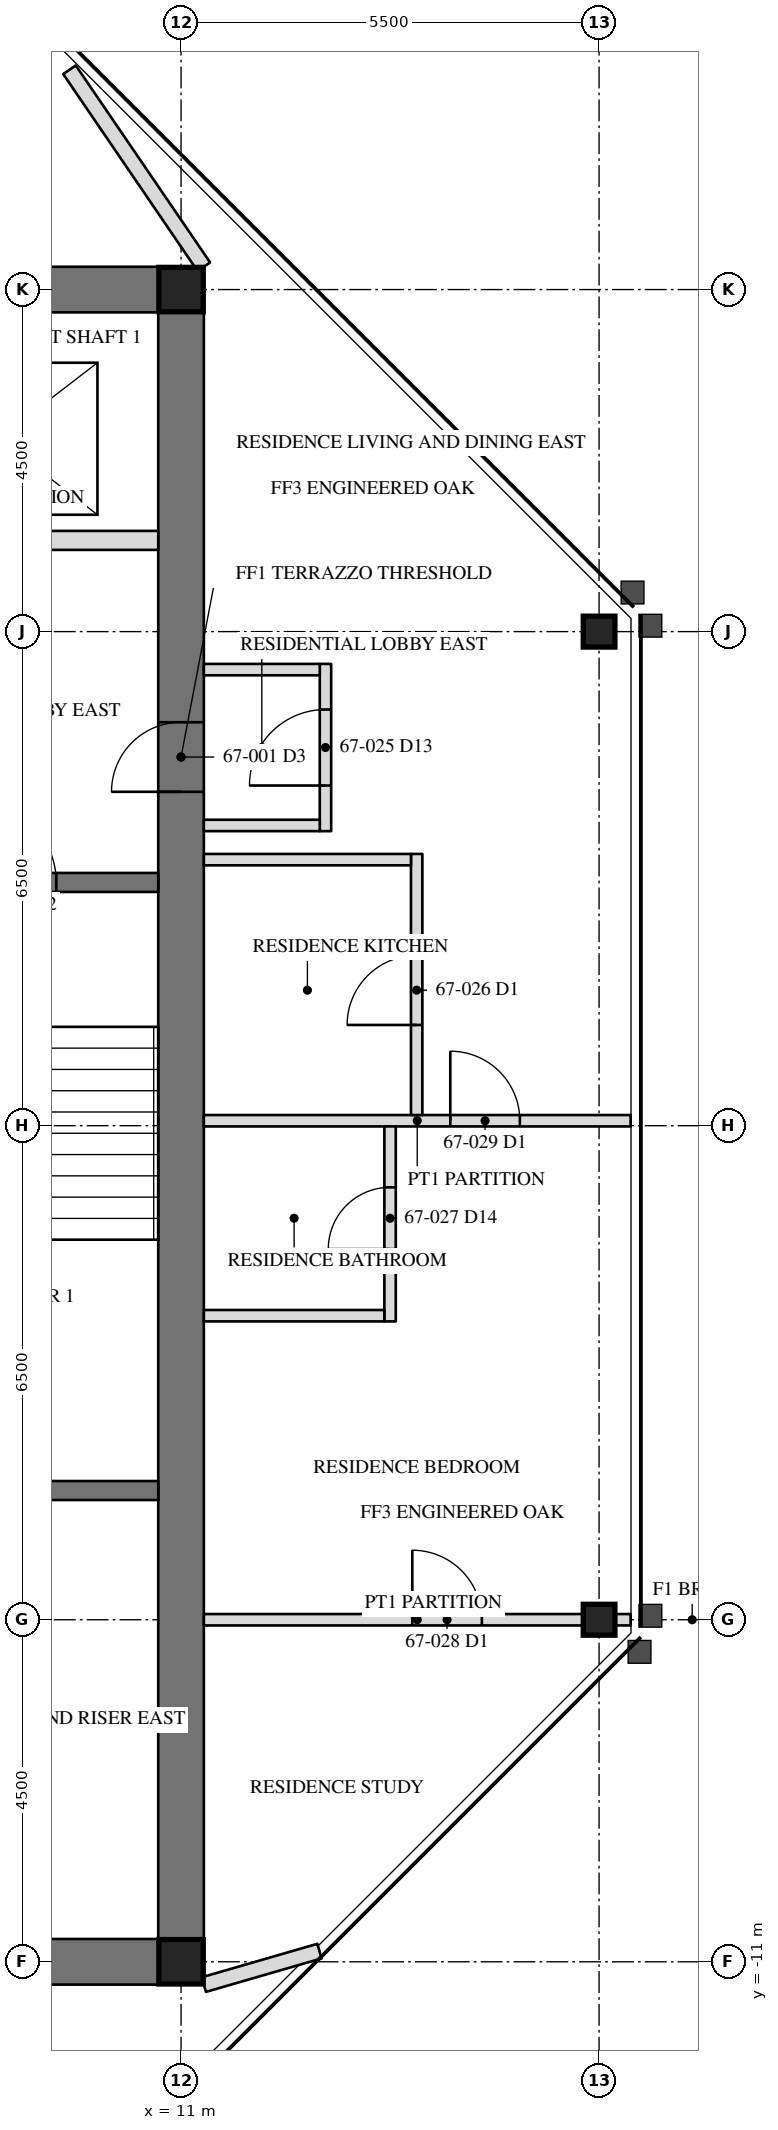
"""IFC4 building model, lengths in metres.
Left out: names, types, materials, properties, quantities, classifications, styles, units other than length and angle.
Written with IfcOpenShell. Run it as: python <this file> out.ifc"""

import sys

from ifc_helpers import new_model, si_unit, direction, frame, frame_2d, origin, origin_2d, place, context, subcontext, project, spatial, rectangle, hollow_rectangle, i_section, extrude, element, fill, save


model = new_model("IFC4")
c1 = context("Model", 3, precision=1e-05, world=origin(), true_north=direction((0.0, 1.0)))
c2 = subcontext(c1, "Body", "Model", "MODEL_VIEW")
j1 = project(units=[si_unit("LENGTHUNIT", "METRE"), si_unit("PLANEANGLEUNIT", "RADIAN")], contexts=[c1])
p1 = place(None, origin())
s1 = spatial("IfcSite", under=j1, at=p1, CompositionType="ELEMENT")
p2 = place(p1, origin())
s2 = spatial("IfcBuilding", under=s1, at=p2, CompositionType="ELEMENT")
p3 = place(p2, frame((0.0, 0.0, 274.0)))
s3 = spatial("IfcBuildingStorey", under=s2, at=p3, CompositionType="ELEMENT", Elevation=274.0)
for number, where, z_axis, x_axis in (
    (1, (16.5, -6.5, 0.0), (0.0, 0.0, 1.0), (0.0, 1.0, 0.0)),
    (2, (16.5, 6.5, 0.0), (0.0, 0.0, 1.0), (0.0, 1.0, 0.0)),
):
    element("IfcColumn", number, at=place(p3, frame(where, z_axis=z_axis, x_axis=x_axis)), inside=s3, PredefinedType="COLUMN", context=c2, shape_type="SweptSolid", body=[
        extrude(i_section(OverallWidth=0.406, OverallDepth=0.417, WebThickness=0.03, FlangeThickness=0.048, at=origin_2d()), origin(), (0.0, 0.0, 1.0), 3.6),
    ])
p4 = place(p3, frame((11.0, -11.0, 0.0), z_axis=(0.0, 0.0, 1.0), x_axis=(0.0, 1.0, 0.0)))
e3 = element("IfcWall", 3, at=p4, inside=s3, PredefinedType="SHEAR", context=c2, shape_type="SweptSolid", body=[
    extrude(rectangle(XDim=22.0, YDim=0.6, at=frame_2d((11.0, 0.0))), origin(), (0.0, 0.0, 1.0), 3.6),
])
p5 = place(p4, frame((15.393, 0.0, 0.0)))
e4 = element("IfcOpeningElement", 4, at=p5, cuts=e3, PredefinedType="OPENING", context=c2, shape_type="SweptSolid", body=[
    extrude(rectangle(XDim=0.915, YDim=2.134, at=frame_2d((0.458, 1.067))), frame((0.0, 0.31, 0.0), z_axis=(0.0, -1.0, 0.0), x_axis=(1.0, 0.0, 0.0)), (0.0, 0.0, 1.0), 0.62),
])
for number, where, z_axis, x_axis in (
    (5, (11.0, 11.0, 0.0), (0.0, 0.0, 1.0), (-1.0, 0.0, 0.0)),
    (6, (6.5, -11.0, 0.0), (0.0, 0.0, 1.0), (1.0, 0.0, 0.0)),
):
    element("IfcWall", number, at=place(p3, frame(where, z_axis=z_axis, x_axis=x_axis)), inside=s3, PredefinedType="SHEAR", context=c2, shape_type="SweptSolid", body=[
        extrude(rectangle(XDim=4.5, YDim=0.6, at=frame_2d((2.25, 0.0))), origin(), (0.0, 0.0, 1.0), 3.6),
    ])
for number, where, z_axis, x_axis in (
    (7, (11.0, 11.0, 0.0), (0.0, 0.0, 1.0), (1.0, 0.0, 0.0)),
    (8, (11.0, -11.0, 0.0), (0.0, 0.0, 1.0), (1.0, 0.0, 0.0)),
):
    element("IfcColumn", number, at=place(p3, frame(where, z_axis=z_axis, x_axis=x_axis)), inside=s3, PredefinedType="COLUMN", context=c2, shape_type="SweptSolid", body=[
        extrude(hollow_rectangle(XDim=0.584, YDim=0.584, WallThickness=0.051, at=origin_2d()), origin(), (0.0, 0.0, 1.0), 3.6),
    ])
p6 = place(p3, frame((6.95, -4.8, 0.0), z_axis=(0.0, 0.0, 1.0), x_axis=(1.0, 0.0, 0.0)))
e9 = element("IfcWall", 9, at=p6, inside=s3, PredefinedType="SOLIDWALL", context=c2, shape_type="SweptSolid", body=[
    extrude(rectangle(XDim=3.75, YDim=0.25, at=frame_2d((1.875, 0.0))), origin(), (0.0, 0.0, 1.0), 3.41),
])
p7 = place(p3, frame((6.95, 3.2, 0.0), z_axis=(0.0, 0.0, 1.0), x_axis=(1.0, 0.0, 0.0)))
e10 = element("IfcWall", 10, at=p7, inside=s3, PredefinedType="SOLIDWALL", context=c2, shape_type="SweptSolid", body=[
    extrude(rectangle(XDim=3.75, YDim=0.25, at=frame_2d((1.875, 0.0))), origin(), (0.0, 0.0, 1.0), 3.41),
])
p8 = place(p7, frame((1.342, 0.0, 0.0)))
e11 = element("IfcOpeningElement", 11, at=p8, cuts=e10, PredefinedType="OPENING", context=c2, shape_type="SweptSolid", body=[
    extrude(rectangle(XDim=1.067, YDim=2.134, at=frame_2d((0.533, 1.067))), frame((0.0, 0.135, 0.0), z_axis=(0.0, -1.0, 0.0), x_axis=(1.0, 0.0, 0.0)), (0.0, 0.0, 1.0), 0.27),
])
p9 = place(p3, frame((6.95, 7.7, 0.0), z_axis=(0.0, 0.0, 1.0), x_axis=(1.0, 0.0, 0.0)))
e12 = element("IfcWall", 12, at=p9, inside=s3, PredefinedType="PARTITIONING", context=c2, shape_type="SweptSolid", body=[
    extrude(rectangle(XDim=3.75, YDim=0.25, at=frame_2d((1.875, 0.0))), origin(), (0.0, 0.0, 1.0), 3.41),
])
p10 = place(p9, frame((0.45, 0.0, 0.0)))
e13 = element("IfcOpeningElement", 13, at=p10, cuts=e12, PredefinedType="OPENING", context=c2, shape_type="SweptSolid", body=[
    extrude(rectangle(XDim=1.219, YDim=2.134, at=frame_2d((0.609, 1.067))), frame((0.0, 0.135, 0.0), z_axis=(0.0, -1.0, 0.0), x_axis=(1.0, 0.0, 0.0)), (0.0, 0.0, 1.0), 0.27),
])
p11 = place(p3, frame((11.3, 11.3, 0.0), z_axis=(0.0, 0.0, 1.0), x_axis=(-0.563469639691, 0.826136771453, 0.0)))
e14 = element("IfcWall", 14, at=p11, inside=s3, PredefinedType="PARTITIONING", context=c2, shape_type="SweptSolid", body=[
    extrude(rectangle(XDim=3.137, YDim=0.2, at=frame_2d((1.568, 0.0))), origin(), (0.0, 0.0, 1.0), 2.704),
])
p12 = place(p3, frame((11.3, -11.3, 0.0), z_axis=(0.0, 0.0, 1.0), x_axis=(0.960552344683, 0.278099250491, 0.0)))
e15 = element("IfcWall", 15, at=p12, inside=s3, PredefinedType="PARTITIONING", context=c2, shape_type="SweptSolid", body=[
    extrude(rectangle(XDim=1.584, YDim=0.2, at=frame_2d((0.792, 0.0))), origin(), (0.0, 0.0, 1.0), 3.41),
])
p13 = place(p3, frame((11.3, -6.5, 0.0), z_axis=(0.0, 0.0, 1.0), x_axis=(1.0, 0.0, 0.0)))
e16 = element("IfcWall", 16, at=p13, inside=s3, PredefinedType="PARTITIONING", context=c2, shape_type="SweptSolid", body=[
    extrude(rectangle(XDim=5.615, YDim=0.15, at=frame_2d((2.808, 0.0))), origin(), (0.0, 0.0, 1.0), 2.966),
])
p14 = place(p13, frame((2.742, 0.0, 0.0)))
e17 = element("IfcOpeningElement", 17, at=p14, cuts=e16, PredefinedType="OPENING", context=c2, shape_type="SweptSolid", body=[
    extrude(rectangle(XDim=0.915, YDim=2.134, at=frame_2d((0.458, 1.067))), frame((0.0, 0.085, 0.0), z_axis=(0.0, -1.0, 0.0), x_axis=(1.0, 0.0, 0.0)), (0.0, 0.0, 1.0), 0.17),
])
p15 = place(p3, frame((11.3, 0.065, 0.0), z_axis=(0.0, 0.0, 1.0), x_axis=(1.0, 0.0, 0.0)))
e18 = element("IfcWall", 18, at=p15, inside=s3, PredefinedType="PARTITIONING", context=c2, shape_type="SweptSolid", body=[
    extrude(rectangle(XDim=5.615, YDim=0.15, at=frame_2d((2.808, 0.0))), origin(), (0.0, 0.0, 1.0), 2.709),
])
p16 = place(p15, frame((3.242, 0.0, 0.0)))
e19 = element("IfcOpeningElement", 19, at=p16, cuts=e18, PredefinedType="OPENING", context=c2, shape_type="SweptSolid", body=[
    extrude(rectangle(XDim=0.915, YDim=2.134, at=frame_2d((0.458, 1.067))), frame((0.0, 0.085, 0.0), z_axis=(0.0, -1.0, 0.0), x_axis=(1.0, 0.0, 0.0)), (0.0, 0.0, 1.0), 0.17),
])
p17 = place(p3, frame((12.9, 3.875, 0.0), z_axis=(0.0, 0.0, 1.0), x_axis=(0.0, 1.0, 0.0)))
e20 = element("IfcWall", 20, at=p17, inside=s3, PredefinedType="PARTITIONING", context=c2, shape_type="SweptSolid", body=[
    extrude(rectangle(XDim=2.2, YDim=0.15, at=frame_2d((1.1, 0.0))), origin(), (0.0, 0.0, 1.0), 3.41),
])
p18 = place(p17, frame((0.6, 0.0, 0.0)))
e21 = element("IfcOpeningElement", 21, at=p18, cuts=e20, PredefinedType="OPENING", context=c2, shape_type="SweptSolid", body=[
    extrude(rectangle(XDim=1.0, YDim=2.134, at=frame_2d((0.5, 1.067))), frame((0.0, 0.085, 0.0), z_axis=(0.0, -1.0, 0.0), x_axis=(1.0, 0.0, 0.0)), (0.0, 0.0, 1.0), 0.17),
])
for number, where, z_axis, x_axis in (
    (22, (11.3, 3.95, 0.0), (0.0, 0.0, 1.0), (1.0, 0.0, 0.0)),
    (23, (11.3, 6.0, 0.0), (0.0, 0.0, 1.0), (1.0, 0.0, 0.0)),
):
    element("IfcWall", number, at=place(p3, frame(where, z_axis=z_axis, x_axis=x_axis)), inside=s3, PredefinedType="PARTITIONING", context=c2, shape_type="SweptSolid", body=[
        extrude(rectangle(XDim=1.525, YDim=0.15, at=frame_2d((0.762, 0.0))), origin(), (0.0, 0.0, 1.0), 3.41),
    ])
p19 = place(p3, frame((14.1, 0.14, 0.0), z_axis=(0.0, 0.0, 1.0), x_axis=(0.0, 1.0, 0.0)))
e24 = element("IfcWall", 24, at=p19, inside=s3, PredefinedType="PARTITIONING", context=c2, shape_type="SweptSolid", body=[
    extrude(rectangle(XDim=3.435, YDim=0.15, at=frame_2d((1.718, 0.0))), origin(), (0.0, 0.0, 1.0), 3.41),
])
p20 = place(p19, frame((1.185, 0.0, 0.0)))
e25 = element("IfcOpeningElement", 25, at=p20, cuts=e24, PredefinedType="OPENING", context=c2, shape_type="SweptSolid", body=[
    extrude(rectangle(XDim=0.915, YDim=2.134, at=frame_2d((0.458, 1.067))), frame((0.0, 0.085, 0.0), z_axis=(0.0, -1.0, 0.0), x_axis=(1.0, 0.0, 0.0)), (0.0, 0.0, 1.0), 0.17),
])
p21 = place(p3, frame((11.3, 3.5, 0.0), z_axis=(0.0, 0.0, 1.0), x_axis=(1.0, 0.0, 0.0)))
e26 = element("IfcWall", 26, at=p21, inside=s3, PredefinedType="PARTITIONING", context=c2, shape_type="SweptSolid", body=[
    extrude(rectangle(XDim=2.725, YDim=0.15, at=frame_2d((1.362, 0.0))), origin(), (0.0, 0.0, 1.0), 3.41),
])
p22 = place(p3, frame((13.75, -2.575, 0.0), z_axis=(0.0, 0.0, 1.0), x_axis=(0.0, 1.0, 0.0)))
e27 = element("IfcWall", 27, at=p22, inside=s3, PredefinedType="PARTITIONING", context=c2, shape_type="SweptSolid", body=[
    extrude(rectangle(XDim=2.565, YDim=0.15, at=frame_2d((1.282, 0.0))), origin(), (0.0, 0.0, 1.0), 3.41),
])
p23 = place(p22, frame((0.951, 0.0, 0.0)))
e28 = element("IfcOpeningElement", 28, at=p23, cuts=e27, PredefinedType="OPENING", context=c2, shape_type="SweptSolid", body=[
    extrude(rectangle(XDim=0.813, YDim=2.032, at=frame_2d((0.406, 1.016))), frame((0.0, 0.085, 0.0), z_axis=(0.0, -1.0, 0.0), x_axis=(1.0, 0.0, 0.0)), (0.0, 0.0, 1.0), 0.17),
])
p24 = place(p3, frame((11.3, -2.5, 0.0), z_axis=(0.0, 0.0, 1.0), x_axis=(1.0, 0.0, 0.0)))
e29 = element("IfcWall", 29, at=p24, inside=s3, PredefinedType="PARTITIONING", context=c2, shape_type="SweptSolid", body=[
    extrude(rectangle(XDim=2.375, YDim=0.15, at=frame_2d((1.188, 0.0))), origin(), (0.0, 0.0, 1.0), 3.41),
])
p25 = place(p5, origin())
e30 = element("IfcDoor", 30, at=p25, inside=s3, OperationType="SINGLE_SWING_RIGHT", PredefinedType="DOOR", context=c2, shape_type="SweptSolid", body=[
    extrude(rectangle(XDim=0.915, YDim=2.134, at=frame_2d((0.458, 1.067))), frame((0.0, -0.225, 0.0), z_axis=(0.0, -1.0, 0.0), x_axis=(1.0, 0.0, 0.0)), (0.0, 0.0, 1.0), 0.05),
])
fill(e4, e30)
p26 = place(p8, origin())
e31 = element("IfcDoor", 31, at=p26, inside=s3, OperationType="SINGLE_SWING_LEFT", PredefinedType="DOOR", context=c2, shape_type="SweptSolid", body=[
    extrude(rectangle(XDim=1.067, YDim=2.134, at=frame_2d((0.533, 1.067))), frame((0.0, 0.025, 0.0), z_axis=(0.0, -1.0, 0.0), x_axis=(1.0, 0.0, 0.0)), (0.0, 0.0, 1.0), 0.05),
])
fill(e11, e31)
p27 = place(p18, origin())
e32 = element("IfcDoor", 32, at=p27, inside=s3, OperationType="SINGLE_SWING_RIGHT", PredefinedType="DOOR", context=c2, shape_type="SweptSolid", body=[
    extrude(rectangle(XDim=1.0, YDim=2.134, at=frame_2d((0.5, 1.067))), frame((0.0, 0.025, 0.0), z_axis=(0.0, -1.0, 0.0), x_axis=(1.0, 0.0, 0.0)), (0.0, 0.0, 1.0), 0.05),
])
fill(e21, e32)
p28 = place(p20, origin())
e33 = element("IfcDoor", 33, at=p28, inside=s3, OperationType="SINGLE_SWING_LEFT", PredefinedType="DOOR", context=c2, shape_type="SweptSolid", body=[
    extrude(rectangle(XDim=0.915, YDim=2.134, at=frame_2d((0.458, 1.067))), frame((0.0, 0.025, 0.0), z_axis=(0.0, -1.0, 0.0), x_axis=(1.0, 0.0, 0.0)), (0.0, 0.0, 1.0), 0.05),
])
fill(e25, e33)
p29 = place(p23, origin())
e34 = element("IfcDoor", 34, at=p29, inside=s3, OperationType="SINGLE_SWING_LEFT", PredefinedType="DOOR", context=c2, shape_type="SweptSolid", body=[
    extrude(rectangle(XDim=0.813, YDim=2.032, at=frame_2d((0.406, 1.016))), frame((0.0, 0.025, 0.0), z_axis=(0.0, -1.0, 0.0), x_axis=(1.0, 0.0, 0.0)), (0.0, 0.0, 1.0), 0.05),
])
fill(e28, e34)
p30 = place(p14, origin())
e35 = element("IfcDoor", 35, at=p30, inside=s3, OperationType="SINGLE_SWING_LEFT", PredefinedType="DOOR", context=c2, shape_type="SweptSolid", body=[
    extrude(rectangle(XDim=0.915, YDim=2.134, at=frame_2d((0.458, 1.067))), frame((0.0, 0.025, 0.0), z_axis=(0.0, -1.0, 0.0), x_axis=(1.0, 0.0, 0.0)), (0.0, 0.0, 1.0), 0.05),
])
fill(e17, e35)
p31 = place(p16, origin())
e36 = element("IfcDoor", 36, at=p31, inside=s3, OperationType="SINGLE_SWING_LEFT", PredefinedType="DOOR", context=c2, shape_type="SweptSolid", body=[
    extrude(rectangle(XDim=0.915, YDim=2.134, at=frame_2d((0.458, 1.067))), frame((0.0, 0.025, 0.0), z_axis=(0.0, -1.0, 0.0), x_axis=(1.0, 0.0, 0.0)), (0.0, 0.0, 1.0), 0.05),
])
fill(e19, e36)
save(model, sys.argv[1])
